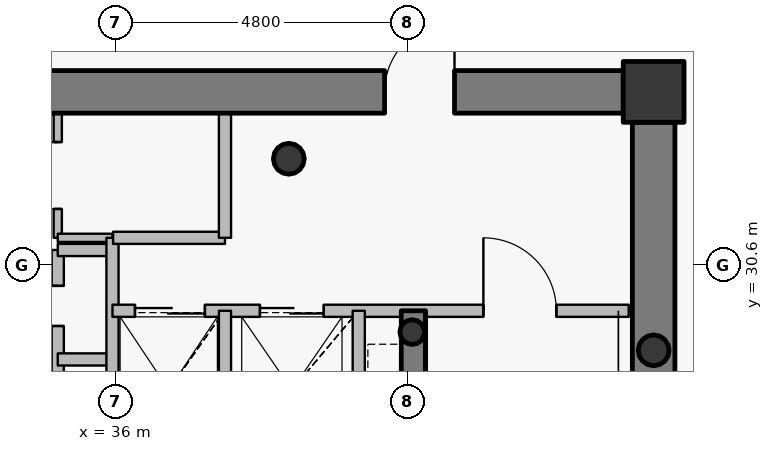
"""IFC4 building model, lengths in metres.
Left out: names, types, materials, properties, quantities, classifications, styles, units other than length and angle.
Written with IfcOpenShell. Run it as: python <this file> out.ifc"""

import sys

from ifc_helpers import new_model, si_unit, direction, frame, frame_2d, origin, origin_2d, place, context, subcontext, project, spatial, rectangle, hollow_circle, extrude, source, transform, mapped, element, fill, save


model = new_model("IFC4")
c1 = context("Model", 3, precision=1e-05, world=origin(), true_north=direction((0.0, 1.0)))
c2 = subcontext(c1, "Body", "Model", "MODEL_VIEW")
j1 = project(units=[si_unit("LENGTHUNIT", "METRE"), si_unit("PLANEANGLEUNIT", "RADIAN")], contexts=[c1])
p1 = place(None, origin())
s1 = spatial("IfcSite", under=j1, at=p1, CompositionType="ELEMENT")
p2 = place(p1, origin())
s2 = spatial("IfcBuilding", under=s1, at=p2, CompositionType="ELEMENT")
p3 = place(p2, frame((0.0, 0.0, 310.5)))
s3 = spatial("IfcBuildingStorey", under=s2, at=p3, CompositionType="ELEMENT", Elevation=310.5)
p4 = place(p3, frame((44.85, 33.45, 0.0), z_axis=(0.0, 0.0, 1.0), x_axis=(1.0, 0.0, 0.0)))
e1 = element("IfcColumn", 1, at=p4, inside=s3, PredefinedType="COLUMN", context=c2, shape_type="SweptSolid", body=[
    extrude(rectangle(XDim=1.0, YDim=1.0, at=origin_2d()), origin(), (0.0, 0.0, 1.0), 3.75),
])
p5 = place(p3, frame((38.85, 32.35, 0.0), z_axis=(0.0, 0.0, 1.0), x_axis=(1.0, 0.0, 0.0)))
e2 = element("IfcColumn", 2, at=p5, inside=s3, PredefinedType="COLUMN", context=c2, shape_type="SweptSolid", body=[
    extrude(hollow_circle(Radius=0.254, WallThickness=0.02, at=origin_2d()), origin(), (0.0, 0.0, 1.0), 3.75),
])
p6 = place(p3, frame((40.88, 29.5, 0.0), z_axis=(0.0, 0.0, 1.0), x_axis=(1.0, 0.0, 0.0)))
e3 = element("IfcColumn", 3, at=p6, inside=s3, PredefinedType="COLUMN", context=c2, shape_type="SweptSolid", body=[
    extrude(hollow_circle(Radius=0.203, WallThickness=0.016, at=origin_2d()), origin(), (0.0, 0.0, 1.0), 3.75),
])
p7 = place(p3, frame((27.65, 33.45, 0.0), z_axis=(0.0, 0.0, 1.0), x_axis=(1.0, 0.0, 0.0)))
e4 = element("IfcWall", 4, at=p7, inside=s3, PredefinedType="SHEAR", context=c2, shape_type="SweptSolid", body=[
    extrude(rectangle(XDim=16.7, YDim=0.7, at=frame_2d((8.35, 0.0))), origin(), (0.0, 0.0, 1.0), 3.05),
])
p8 = place(p7, frame((12.775, 0.0, 0.0)))
e5 = element("IfcOpeningElement", 5, at=p8, cuts=e4, PredefinedType="OPENING", context=c2, shape_type="SweptSolid", body=[
    extrude(rectangle(XDim=1.15, YDim=2.15, at=origin_2d()), frame((0.575, 0.36, 1.075), z_axis=(0.0, -1.0, 0.0), x_axis=(1.0, 0.0, 0.0)), (0.0, 0.0, 1.0), 0.72),
])
p9 = place(p3, frame((44.85, 32.95, 0.0), z_axis=(0.0, 0.0, 1.0), x_axis=(0.0, -1.0, 0.0)))
e6 = element("IfcWall", 6, at=p9, inside=s3, PredefinedType="SHEAR", context=c2, shape_type="SweptSolid", body=[
    extrude(rectangle(XDim=11.9, YDim=0.7, at=frame_2d((5.95, 0.0))), origin(), (0.0, 0.0, 1.0), 3.05),
])
p10 = place(p3, frame((40.9, 27.25, 0.0), z_axis=(0.0, 0.0, 1.0), x_axis=(0.0, 1.0, 0.0)))
e7 = element("IfcWall", 7, at=p10, inside=s3, PredefinedType="SHEAR", context=c2, shape_type="SweptSolid", body=[
    extrude(rectangle(XDim=2.6, YDim=0.4, at=frame_2d((1.3, 0.0))), origin(), (0.0, 0.0, 1.0), 3.1),
])
p11 = place(p3, frame((44.85, 29.2, 0.0), z_axis=(0.0, 0.0, 1.0), x_axis=(1.0, 0.0, 0.0)))
e8 = element("IfcColumn", 8, at=p11, inside=s3, PredefinedType="COLUMN", context=c2, shape_type="SweptSolid", body=[
    extrude(hollow_circle(Radius=0.254, WallThickness=0.02, at=origin_2d()), origin(), (0.0, 0.0, 1.0), 3.75),
])
p12 = place(p3, frame((35.05, 27.25, 0.0), z_axis=(0.0, 0.0, 1.0), x_axis=(0.0, 1.0, 0.0)))
e9 = element("IfcWall", 9, at=p12, inside=s3, PredefinedType="PARTITIONING", context=c2, shape_type="SweptSolid", body=[
    extrude(rectangle(XDim=3.6, YDim=0.2, at=frame_2d((1.8, 0.0))), origin(), (0.0, 0.0, 1.0), 3.5),
])
p13 = place(p12, frame((0.59, 0.0, 0.0)))
e10 = element("IfcOpeningElement", 10, at=p13, cuts=e9, PredefinedType="OPENING", context=c2, shape_type="SweptSolid", body=[
    extrude(rectangle(XDim=0.66, YDim=2.05, at=origin_2d()), frame((0.33, 0.11, 1.025), z_axis=(0.0, -1.0, 0.0), x_axis=(1.0, 0.0, 0.0)), (0.0, 0.0, 1.0), 0.22),
])
p14 = place(p12, frame((2.35, 0.0, 0.0)))
e11 = element("IfcOpeningElement", 11, at=p14, cuts=e9, PredefinedType="OPENING", context=c2, shape_type="SweptSolid", body=[
    extrude(rectangle(XDim=0.66, YDim=2.05, at=origin_2d()), frame((0.33, 0.11, 1.025), z_axis=(0.0, -1.0, 0.0), x_axis=(1.0, 0.0, 0.0)), (0.0, 0.0, 1.0), 0.22),
])
for number, where, z_axis, x_axis in (
    (12, (35.05, 29.05, 0.0), (0.0, 0.0, 1.0), (1.0, 0.0, 0.0)),
    (13, (35.05, 30.85, 0.0), (0.0, 0.0, 1.0), (1.0, 0.0, 0.0)),
):
    element("IfcWall", number, at=place(p3, frame(where, z_axis=z_axis, x_axis=x_axis)), inside=s3, PredefinedType="PARTITIONING", context=c2, shape_type="SweptSolid", body=[
        extrude(rectangle(XDim=0.9, YDim=0.2, at=frame_2d((0.45, 0.0))), origin(), (0.0, 0.0, 1.0), 3.5),
    ])
p15 = place(p3, frame((35.05, 31.05, 0.0), z_axis=(0.0, 0.0, 1.0), x_axis=(0.0, 1.0, 0.0)))
e14 = element("IfcWall", 14, at=p15, inside=s3, PredefinedType="PARTITIONING", context=c2, shape_type="SweptSolid", body=[
    extrude(rectangle(XDim=2.05, YDim=0.135, at=frame_2d((1.025, 0.0))), origin(), (0.0, 0.0, 1.0), 3.085),
])
p16 = place(p15, frame((0.475, 0.0, 0.0)))
e15 = element("IfcOpeningElement", 15, at=p16, cuts=e14, PredefinedType="OPENING", context=c2, shape_type="SweptSolid", body=[
    extrude(rectangle(XDim=1.1, YDim=2.15, at=origin_2d()), frame((0.55, 0.078, 1.075), z_axis=(0.0, -1.0, 0.0), x_axis=(1.0, 0.0, 0.0)), (0.0, 0.0, 1.0), 0.155),
])
p17 = place(p3, frame((35.05, 31.05, 0.0), z_axis=(0.0, 0.0, 1.0), x_axis=(1.0, 0.0, 0.0)))
e16 = element("IfcWall", 16, at=p17, inside=s3, PredefinedType="PARTITIONING", context=c2, shape_type="SweptSolid", body=[
    extrude(rectangle(XDim=0.9, YDim=0.135, at=frame_2d((0.45, 0.0))), origin(), (0.0, 0.0, 1.0), 3.5),
])
p18 = place(p3, frame((35.95, 27.25, 0.0), z_axis=(0.0, 0.0, 1.0), x_axis=(0.0, 1.0, 0.0)))
e17 = element("IfcWall", 17, at=p18, inside=s3, PredefinedType="PARTITIONING", context=c2, shape_type="SweptSolid", body=[
    extrude(rectangle(XDim=3.8, YDim=0.2, at=frame_2d((1.9, 0.0))), origin(), (0.0, 0.0, 1.0), 3.5),
])
p19 = place(p3, frame((35.95, 29.85, 0.0), z_axis=(0.0, 0.0, 1.0), x_axis=(1.0, 0.0, 0.0)))
e18 = element("IfcWall", 18, at=p19, inside=s3, PredefinedType="PARTITIONING", context=c2, shape_type="SweptSolid", body=[
    extrude(rectangle(XDim=8.49, YDim=0.2, at=frame_2d((4.245, 0.0))), origin(), (0.0, 0.0, 1.0), 3.085),
])
p20 = place(p19, frame((6.1, 0.0, 0.0)))
e19 = element("IfcOpeningElement", 19, at=p20, cuts=e18, PredefinedType="OPENING", context=c2, shape_type="SweptSolid", body=[
    extrude(rectangle(XDim=1.2, YDim=2.15, at=origin_2d()), frame((0.6, 0.11, 1.075), z_axis=(0.0, -1.0, 0.0), x_axis=(1.0, 0.0, 0.0)), (0.0, 0.0, 1.0), 0.22),
])
p21 = place(p19, frame((0.37, 0.0, 0.0)))
e20 = element("IfcOpeningElement", 20, at=p21, cuts=e18, PredefinedType="OPENING", context=c2, shape_type="SweptSolid", body=[
    extrude(rectangle(XDim=1.15, YDim=2.15, at=origin_2d()), frame((0.575, 0.11, 1.075), z_axis=(0.0, -1.0, 0.0), x_axis=(1.0, 0.0, 0.0)), (0.0, 0.0, 1.0), 0.22),
])
p22 = place(p19, frame((2.425, 0.0, 0.0)))
e21 = element("IfcOpeningElement", 21, at=p22, cuts=e18, PredefinedType="OPENING", context=c2, shape_type="SweptSolid", body=[
    extrude(rectangle(XDim=1.05, YDim=2.15, at=origin_2d()), frame((0.525, 0.11, 1.075), z_axis=(0.0, -1.0, 0.0), x_axis=(1.0, 0.0, 0.0)), (0.0, 0.0, 1.0), 0.22),
])
p23 = place(p3, frame((35.96, 31.05, 0.0), z_axis=(0.0, 0.0, 1.0), x_axis=(1.0, 0.0, 0.0)))
e22 = element("IfcWall", 22, at=p23, inside=s3, PredefinedType="PARTITIONING", context=c2, shape_type="SweptSolid", body=[
    extrude(rectangle(XDim=1.84, YDim=0.2, at=frame_2d((0.92, 0.0))), origin(), (0.0, 0.0, 1.0), 3.5),
])
p24 = place(p3, frame((37.8, 27.25, 0.0), z_axis=(0.0, 0.0, 1.0), x_axis=(0.0, 1.0, 0.0)))
e23 = element("IfcWall", 23, at=p24, inside=s3, PredefinedType="PARTITIONING", context=c2, shape_type="SweptSolid", body=[
    extrude(rectangle(XDim=2.6, YDim=0.2, at=frame_2d((1.3, 0.0))), origin(), (0.0, 0.0, 1.0), 3.5),
])
p25 = place(p3, frame((37.8, 31.05, 0.0), z_axis=(0.0, 0.0, 1.0), x_axis=(0.0, 1.0, 0.0)))
e24 = element("IfcWall", 24, at=p25, inside=s3, PredefinedType="PARTITIONING", context=c2, shape_type="SweptSolid", body=[
    extrude(rectangle(XDim=2.05, YDim=0.2, at=frame_2d((1.025, 0.0))), origin(), (0.0, 0.0, 1.0), 3.085),
])
p26 = place(p3, frame((40.0, 25.45, 0.0), z_axis=(0.0, 0.0, 1.0), x_axis=(0.0, 1.0, 0.0)))
e25 = element("IfcWall", 25, at=p26, inside=s3, PredefinedType="PARTITIONING", context=c2, shape_type="SweptSolid", body=[
    extrude(rectangle(XDim=4.4, YDim=0.2, at=frame_2d((2.2, 0.0))), origin(), (0.0, 0.0, 1.0), 3.5),
])
p27 = place(p3, frame((45.2, 33.8, 0.0), z_axis=(0.0, 0.0, 1.0), x_axis=(-1.0, 0.0, 0.0)))
e26 = element("IfcWall", 26, at=p27, inside=s3, PredefinedType="PARTITIONING", context=c2, shape_type="SweptSolid", body=[
    extrude(rectangle(XDim=0.84, YDim=0.135, at=frame_2d((0.42, 0.0))), origin(), (0.0, 0.0, 1.0), 3.035),
])
p28 = place(p3, frame((45.2, 32.96, 0.0), z_axis=(0.0, 0.0, 1.0), x_axis=(0.0, 1.0, 0.0)))
e27 = element("IfcWall", 27, at=p28, inside=s3, PredefinedType="PARTITIONING", context=c2, shape_type="SweptSolid", body=[
    extrude(rectangle(XDim=0.532, YDim=0.135, at=frame_2d((0.266, 0.0))), origin(), (0.0, 0.0, 1.0), 3.5),
])
m1 = source(origin(), c2, "Body", "SweptSolid", [
    extrude(rectangle(XDim=1.15, YDim=2.15, at=origin_2d()), frame((0.575, 0.025, 1.075), z_axis=(0.0, -1.0, 0.0), x_axis=(1.0, 0.0, 0.0)), (0.0, 0.0, 1.0), 0.05),
])
p29 = place(p8, origin())
e28 = element("IfcDoor", 28, at=p29, inside=s3, OperationType="SINGLE_SWING_RIGHT", PredefinedType="DOOR", context=c2, shape_type="MappedRepresentation", body=[
    mapped(m1, transform((0.0, 0.0, 0.0), x_axis=(1.0, 0.0, 0.0), y_axis=(0.0, 1.0, 0.0), z_axis=(0.0, 0.0, 1.0), scale=1.0)),
])
fill(e5, e28)
m2 = source(origin(), c2, "Body", "SweptSolid", [
    extrude(rectangle(XDim=1.2, YDim=2.15, at=origin_2d()), frame((0.6, 0.025, 1.075), z_axis=(0.0, -1.0, 0.0), x_axis=(1.0, 0.0, 0.0)), (0.0, 0.0, 1.0), 0.05),
])
p30 = place(p20, origin())
e29 = element("IfcDoor", 29, at=p30, inside=s3, OperationType="SINGLE_SWING_LEFT", PredefinedType="DOOR", context=c2, shape_type="MappedRepresentation", body=[
    mapped(m2, transform((0.0, 0.0, 0.0), x_axis=(1.0, 0.0, 0.0), y_axis=(0.0, 1.0, 0.0), z_axis=(0.0, 0.0, 1.0), scale=1.0)),
])
fill(e19, e29)
m3 = source(origin(), c2, "Body", "SweptSolid", [
    extrude(rectangle(XDim=1.15, YDim=2.15, at=origin_2d()), frame((0.575, 0.025, 1.075), z_axis=(0.0, -1.0, 0.0), x_axis=(1.0, 0.0, 0.0)), (0.0, 0.0, 1.0), 0.05),
])
p31 = place(p21, origin())
e30 = element("IfcDoor", 30, at=p31, inside=s3, OperationType="DOUBLE_DOOR_SLIDING", PredefinedType="USERDEFINED", context=c2, shape_type="MappedRepresentation", body=[
    mapped(m3, transform((0.0, 0.0, 0.0), x_axis=(1.0, 0.0, 0.0), y_axis=(0.0, 1.0, 0.0), z_axis=(0.0, 0.0, 1.0), scale=1.0)),
])
fill(e20, e30)
m4 = source(origin(), c2, "Body", "SweptSolid", [
    extrude(rectangle(XDim=1.05, YDim=2.15, at=origin_2d()), frame((0.525, 0.025, 1.075), z_axis=(0.0, -1.0, 0.0), x_axis=(1.0, 0.0, 0.0)), (0.0, 0.0, 1.0), 0.05),
])
p32 = place(p22, origin())
e31 = element("IfcDoor", 31, at=p32, inside=s3, OperationType="DOUBLE_DOOR_SLIDING", PredefinedType="USERDEFINED", context=c2, shape_type="MappedRepresentation", body=[
    mapped(m4, transform((0.0, 0.0, 0.0), x_axis=(1.0, 0.0, 0.0), y_axis=(0.0, 1.0, 0.0), z_axis=(0.0, 0.0, 1.0), scale=1.0)),
])
fill(e21, e31)
m5 = source(origin(), c2, "Body", "SweptSolid", [
    extrude(rectangle(XDim=0.66, YDim=2.05, at=origin_2d()), frame((0.33, 0.025, 1.025), z_axis=(0.0, -1.0, 0.0), x_axis=(1.0, 0.0, 0.0)), (0.0, 0.0, 1.0), 0.05),
])
p33 = place(p14, origin())
e32 = element("IfcDoor", 32, at=p33, inside=s3, OperationType="SINGLE_SWING_RIGHT", PredefinedType="USERDEFINED", context=c2, shape_type="MappedRepresentation", body=[
    mapped(m5, transform((0.0, 0.0, 0.0), x_axis=(1.0, 0.0, 0.0), y_axis=(0.0, 1.0, 0.0), z_axis=(0.0, 0.0, 1.0), scale=1.0)),
])
fill(e11, e32)
m6 = source(origin(), c2, "Body", "SweptSolid", [
    extrude(rectangle(XDim=1.1, YDim=2.15, at=origin_2d()), frame((0.55, 0.025, 1.075), z_axis=(0.0, -1.0, 0.0), x_axis=(1.0, 0.0, 0.0)), (0.0, 0.0, 1.0), 0.05),
])
p34 = place(p16, origin())
e33 = element("IfcDoor", 33, at=p34, inside=s3, OperationType="SINGLE_SWING_RIGHT", PredefinedType="DOOR", context=c2, shape_type="MappedRepresentation", body=[
    mapped(m6, transform((0.0, 0.0, 0.0), x_axis=(1.0, 0.0, 0.0), y_axis=(0.0, 1.0, 0.0), z_axis=(0.0, 0.0, 1.0), scale=1.0)),
])
fill(e15, e33)
save(model, sys.argv[1])
